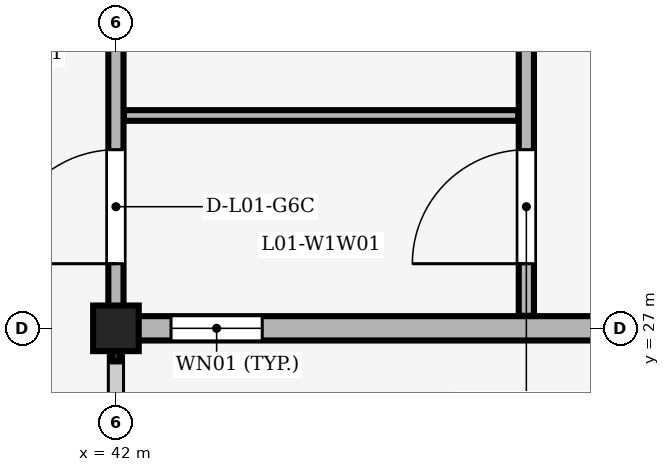
"""IFC4 building model, lengths in metres.
Left out: names, types, materials, properties, quantities, classifications, styles, units other than length and angle.
Written with IfcOpenShell. Run it as: python <this file> out.ifc"""

import sys

from ifc_helpers import new_model, si_unit, direction, frame, frame_2d, origin, origin_2d, place, context, subcontext, project, spatial, rectangle, extrude, element, fill, save


model = new_model("IFC4")
c1 = context("Model", 3, precision=1e-05, world=origin(), true_north=direction((0.0, 1.0)))
c2 = subcontext(c1, "Body", "Model", "MODEL_VIEW")
j1 = project(units=[si_unit("LENGTHUNIT", "METRE"), si_unit("PLANEANGLEUNIT", "RADIAN")], contexts=[c1])
p1 = place(None, origin())
s1 = spatial("IfcSite", under=j1, at=p1, CompositionType="ELEMENT")
p2 = place(p1, origin())
s2 = spatial("IfcBuilding", under=s1, at=p2, CompositionType="ELEMENT")
p3 = place(p2, frame((0.0, 0.0, 4.8)))
s3 = spatial("IfcBuildingStorey", under=s2, at=p3, CompositionType="ELEMENT", Elevation=4.8)
p4 = place(p3, frame((42.0, 27.0, 0.0), z_axis=(0.0, 0.0, 1.0), x_axis=(1.0, 0.0, 0.0)))
e1 = element("IfcColumn", 1, at=p4, inside=s3, PredefinedType="COLUMN", context=c2, shape_type="SweptSolid", body=[
    extrude(rectangle(XDim=0.6, YDim=0.6, at=origin_2d()), origin(), (0.0, 0.0, 1.0), 4.2),
])
p5 = place(p3, frame((42.275, 27.0, 0.0), z_axis=(0.0, 0.0, 1.0), x_axis=(1.0, 0.0, 0.0)))
e2 = element("IfcWall", 2, at=p5, inside=s3, PredefinedType="SOLIDWALL", context=c2, shape_type="SweptSolid", body=[
    extrude(rectangle(XDim=7.85, YDim=0.32, at=frame_2d((3.925, 0.0))), origin(), (0.0, 0.0, 1.0), 3.13),
])
p6 = place(p5, frame((0.45, 0.0, 0.9)))
e3 = element("IfcOpeningElement", 3, at=p6, cuts=e2, PredefinedType="OPENING", context=c2, shape_type="SweptSolid", body=[
    extrude(rectangle(XDim=1.2, YDim=1.5, at=frame_2d((0.6, 0.75))), frame((0.0, 0.17, 0.0), z_axis=(0.0, -1.0, 0.0), x_axis=(1.0, 0.0, 0.0)), (0.0, 0.0, 1.0), 0.34),
])
p7 = place(p5, frame((6.2, 0.0, 0.9)))
e4 = element("IfcOpeningElement", 4, at=p7, cuts=e2, PredefinedType="OPENING", context=c2, shape_type="SweptSolid", body=[
    extrude(rectangle(XDim=1.2, YDim=1.8, at=frame_2d((0.6, 0.9))), frame((0.0, 0.17, 0.0), z_axis=(0.0, -1.0, 0.0), x_axis=(1.0, 0.0, 0.0)), (0.0, 0.0, 1.0), 0.34),
])
p8 = place(p3, frame((42.105, 29.8, 0.0), z_axis=(0.0, 0.0, 1.0), x_axis=(1.0, 0.0, 0.0)))
e5 = element("IfcWall", 5, at=p8, inside=s3, PredefinedType="PARTITIONING", context=c2, shape_type="SweptSolid", body=[
    extrude(rectangle(XDim=5.19, YDim=0.14, at=frame_2d((2.595, 0.0))), origin(), (0.0, 0.0, 1.0), 3.43),
])
p9 = place(p3, frame((47.4, 27.165, 0.0), z_axis=(0.0, 0.0, 1.0), x_axis=(0.0, 1.0, 0.0)))
e6 = element("IfcWall", 6, at=p9, inside=s3, PredefinedType="PARTITIONING", context=c2, shape_type="SweptSolid", body=[
    extrude(rectangle(XDim=58.625, YDim=0.2, at=frame_2d((29.312, 0.0))), origin(), (0.0, 0.0, 1.0), 3.9),
])
p10 = place(p9, frame((0.685, 0.0, 0.0)))
e7 = element("IfcOpeningElement", 7, at=p10, cuts=e6, PredefinedType="OPENING", context=c2, shape_type="SweptSolid", body=[
    extrude(rectangle(XDim=1.5, YDim=2.2, at=frame_2d((0.75, 1.1))), frame((0.0, 0.11, 0.0), z_axis=(0.0, -1.0, 0.0), x_axis=(1.0, 0.0, 0.0)), (0.0, 0.0, 1.0), 0.22),
])
p11 = place(p9, frame((4.935, 0.0, 0.0)))
e8 = element("IfcOpeningElement", 8, at=p11, cuts=e6, PredefinedType="OPENING", context=c2, shape_type="SweptSolid", body=[
    extrude(rectangle(XDim=1.0, YDim=2.15, at=frame_2d((0.5, 1.075))), frame((0.0, 0.11, 0.0), z_axis=(0.0, -1.0, 0.0), x_axis=(1.0, 0.0, 0.0)), (0.0, 0.0, 1.0), 0.22),
])
p12 = place(p9, frame((11.935, 0.0, 0.0)))
e9 = element("IfcOpeningElement", 9, at=p12, cuts=e6, PredefinedType="OPENING", context=c2, shape_type="SweptSolid", body=[
    extrude(rectangle(XDim=1.0, YDim=2.15, at=frame_2d((0.5, 1.075))), frame((0.0, 0.11, 0.0), z_axis=(0.0, -1.0, 0.0), x_axis=(1.0, 0.0, 0.0)), (0.0, 0.0, 1.0), 0.22),
])
p13 = place(p9, frame((20.335, 0.0, 0.0)))
e10 = element("IfcOpeningElement", 10, at=p13, cuts=e6, PredefinedType="OPENING", context=c2, shape_type="SweptSolid", body=[
    extrude(rectangle(XDim=1.0, YDim=2.15, at=frame_2d((0.5, 1.075))), frame((0.0, 0.11, 0.0), z_axis=(0.0, -1.0, 0.0), x_axis=(1.0, 0.0, 0.0)), (0.0, 0.0, 1.0), 0.22),
])
p14 = place(p9, frame((27.36, 0.0, 0.0)))
e11 = element("IfcOpeningElement", 11, at=p14, cuts=e6, PredefinedType="OPENING", context=c2, shape_type="SweptSolid", body=[
    extrude(rectangle(XDim=0.95, YDim=2.2, at=frame_2d((0.475, 1.1))), frame((0.0, 0.11, 0.0), z_axis=(0.0, -1.0, 0.0), x_axis=(1.0, 0.0, 0.0)), (0.0, 0.0, 1.0), 0.22),
])
p15 = place(p9, frame((32.96, 0.0, 0.0)))
e12 = element("IfcOpeningElement", 12, at=p15, cuts=e6, PredefinedType="OPENING", context=c2, shape_type="SweptSolid", body=[
    extrude(rectangle(XDim=0.95, YDim=2.2, at=frame_2d((0.475, 1.1))), frame((0.0, 0.11, 0.0), z_axis=(0.0, -1.0, 0.0), x_axis=(1.0, 0.0, 0.0)), (0.0, 0.0, 1.0), 0.22),
])
p16 = place(p9, frame((38.56, 0.0, 0.0)))
e13 = element("IfcOpeningElement", 13, at=p16, cuts=e6, PredefinedType="OPENING", context=c2, shape_type="SweptSolid", body=[
    extrude(rectangle(XDim=0.95, YDim=2.1, at=frame_2d((0.475, 1.05))), frame((0.0, 0.11, 0.0), z_axis=(0.0, -1.0, 0.0), x_axis=(1.0, 0.0, 0.0)), (0.0, 0.0, 1.0), 0.22),
])
p17 = place(p9, frame((45.535, 0.0, 0.0)))
e14 = element("IfcOpeningElement", 14, at=p17, cuts=e6, PredefinedType="OPENING", context=c2, shape_type="SweptSolid", body=[
    extrude(rectangle(XDim=1.0, YDim=2.15, at=frame_2d((0.5, 1.075))), frame((0.0, 0.11, 0.0), z_axis=(0.0, -1.0, 0.0), x_axis=(1.0, 0.0, 0.0)), (0.0, 0.0, 1.0), 0.22),
])
p18 = place(p9, frame((53.935, 0.0, 0.0)))
e15 = element("IfcOpeningElement", 15, at=p18, cuts=e6, PredefinedType="OPENING", context=c2, shape_type="SweptSolid", body=[
    extrude(rectangle(XDim=1.0, YDim=2.15, at=frame_2d((0.5, 1.075))), frame((0.0, 0.11, 0.0), z_axis=(0.0, -1.0, 0.0), x_axis=(1.0, 0.0, 0.0)), (0.0, 0.0, 1.0), 0.22),
])
p19 = place(p3, frame((42.0, 27.165, 0.0), z_axis=(0.0, 0.0, 1.0), x_axis=(0.0, 1.0, 0.0)))
e16 = element("IfcWall", 16, at=p19, inside=s3, PredefinedType="PARTITIONING", context=c2, shape_type="SweptSolid", body=[
    extrude(rectangle(XDim=7.925, YDim=0.2, at=frame_2d((3.962, 0.0))), origin(), (0.0, 0.0, 1.0), 3.272),
])
p20 = place(p19, frame((0.685, 0.0, 0.0)))
e17 = element("IfcOpeningElement", 17, at=p20, cuts=e16, PredefinedType="OPENING", context=c2, shape_type="SweptSolid", body=[
    extrude(rectangle(XDim=1.5, YDim=2.2, at=frame_2d((0.75, 1.1))), frame((0.0, 0.11, 0.0), z_axis=(0.0, -1.0, 0.0), x_axis=(1.0, 0.0, 0.0)), (0.0, 0.0, 1.0), 0.22),
])
p21 = place(p19, frame((4.935, 0.0, 0.0)))
e18 = element("IfcOpeningElement", 18, at=p21, cuts=e16, PredefinedType="OPENING", context=c2, shape_type="SweptSolid", body=[
    extrude(rectangle(XDim=1.0, YDim=2.15, at=frame_2d((0.5, 1.075))), frame((0.0, 0.11, 0.0), z_axis=(0.0, -1.0, 0.0), x_axis=(1.0, 0.0, 0.0)), (0.0, 0.0, 1.0), 0.22),
])
p22 = place(p6, origin())
e19 = element("IfcWindow", 19, at=p22, inside=s3, PartitioningType="SINGLE_PANEL", PredefinedType="WINDOW", context=c2, shape_type="SweptSolid", body=[
    extrude(rectangle(XDim=1.2, YDim=1.5, at=frame_2d((0.6, 0.75))), frame((0.0, 0.03, 0.0), z_axis=(0.0, -1.0, 0.0), x_axis=(1.0, 0.0, 0.0)), (0.0, 0.0, 1.0), 0.06),
])
fill(e3, e19)
p23 = place(p10, origin())
e20 = element("IfcDoor", 20, at=p23, inside=s3, OperationType="DOUBLE_DOOR_SINGLE_SWING", PredefinedType="DOOR", context=c2, shape_type="SweptSolid", body=[
    extrude(rectangle(XDim=1.5, YDim=2.2, at=frame_2d((0.75, 1.1))), frame((0.0, 0.025, 0.0), z_axis=(0.0, -1.0, 0.0), x_axis=(1.0, 0.0, 0.0)), (0.0, 0.0, 1.0), 0.05),
])
fill(e7, e20)
p24 = place(p20, origin())
e21 = element("IfcDoor", 21, at=p24, inside=s3, OperationType="DOUBLE_DOOR_SINGLE_SWING", PredefinedType="DOOR", context=c2, shape_type="SweptSolid", body=[
    extrude(rectangle(XDim=1.5, YDim=2.2, at=frame_2d((0.75, 1.1))), frame((0.0, 0.025, 0.0), z_axis=(0.0, -1.0, 0.0), x_axis=(1.0, 0.0, 0.0)), (0.0, 0.0, 1.0), 0.05),
])
fill(e17, e21)
save(model, sys.argv[1])
